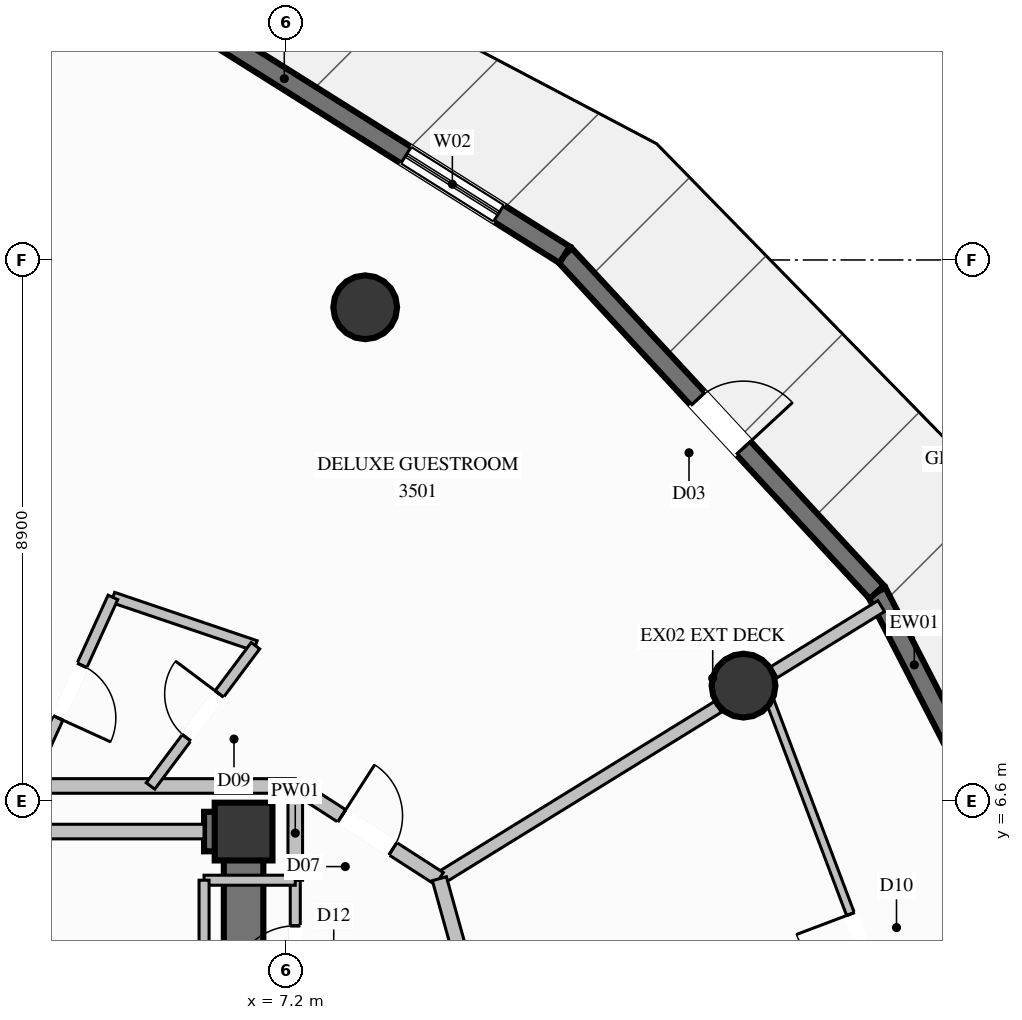
"""IFC4 building model, lengths in metres.
Left out: names, types, materials, properties, quantities, classifications, styles, units other than length and angle.
Written with IfcOpenShell. Run it as: python <this file> out.ifc"""

import sys

from ifc_helpers import new_model, si_unit, direction, frame, frame_2d, origin, origin_2d, place, context, subcontext, project, spatial, rectangle, circle, extrude, element, fill, save


model = new_model("IFC4")
c1 = context("Model", 3, precision=1e-05, world=origin(), true_north=direction((0.0, 1.0)))
c2 = subcontext(c1, "Body", "Model", "MODEL_VIEW")
j1 = project(units=[si_unit("LENGTHUNIT", "METRE"), si_unit("PLANEANGLEUNIT", "RADIAN")], contexts=[c1])
p1 = place(None, origin())
s1 = spatial("IfcSite", under=j1, at=p1, CompositionType="ELEMENT")
p2 = place(p1, origin())
s2 = spatial("IfcBuilding", under=s1, at=p2, CompositionType="ELEMENT")
p3 = place(p2, frame((0.0, 0.0, 131.4)))
s3 = spatial("IfcBuildingStorey", under=s2, at=p3, CompositionType="ELEMENT", Elevation=131.4)
p4 = place(p3, frame((6.5, 6.1, 0.0), z_axis=(0.0, 0.0, 1.0), x_axis=(1.0, 0.0, 0.0)))
e1 = element("IfcColumn", 1, at=p4, inside=s3, PredefinedType="COLUMN", context=c2, shape_type="SweptSolid", body=[
    extrude(rectangle(XDim=0.95, YDim=0.95, at=origin_2d()), origin(), (0.0, 0.0, 1.0), 3.6),
])
p5 = place(p3, frame((5.85, 6.1, 0.0), z_axis=(0.0, 0.0, 1.0), x_axis=(1.0, 0.0, 0.0)))
e2 = element("IfcWall", 2, at=p5, inside=s3, PredefinedType="SHEAR", context=c2, shape_type="SweptSolid", body=[
    extrude(rectangle(XDim=0.325, YDim=0.65, at=frame_2d((0.163, 0.0))), origin(), (0.0, 0.0, 1.0), 3.6),
])
p6 = place(p3, frame((6.5, 3.35, 0.0), z_axis=(0.0, 0.0, 1.0), x_axis=(0.0, 1.0, 0.0)))
e3 = element("IfcWall", 3, at=p6, inside=s3, PredefinedType="SHEAR", context=c2, shape_type="SweptSolid", body=[
    extrude(rectangle(XDim=3.075, YDim=0.65, at=frame_2d((1.538, 0.0))), origin(), (0.0, 0.0, 1.0), 3.6),
])
for number, where, z_axis, x_axis in (
    (4, (14.722, 8.5, 0.0), (0.0, 0.0, 1.0), (1.0, 0.0, 0.0)),
    (5, (8.5, 14.722, 0.0), (0.0, 0.0, 1.0), (1.0, 0.0, 0.0)),
):
    element("IfcColumn", number, at=place(p3, frame(where, z_axis=z_axis, x_axis=x_axis)), inside=s3, PredefinedType="COLUMN", context=c2, shape_type="SweptSolid", body=[
        extrude(circle(Radius=0.525, at=origin_2d()), origin(), (0.0, 0.0, 1.0), 3.6),
    ])
p7 = place(p3, frame((16.914, 10.037, 0.0), z_axis=(0.0, 0.0, 1.0), x_axis=(0.458173043938, -0.888863016335, 0.0)))
e6 = element("IfcWall", 6, at=p7, inside=s3, PredefinedType="SOLIDWALL", context=c2, shape_type="SweptSolid", body=[
    extrude(rectangle(XDim=7.346, YDim=0.32, at=frame_2d((3.673, 0.0))), origin(), (0.0, 0.0, 1.0), 3.35),
])
p8 = place(p7, frame((2.942, 0.0, 0.35)))
e7 = element("IfcOpeningElement", 7, at=p8, cuts=e6, PredefinedType="OPENING", context=c2, shape_type="SweptSolid", body=[
    extrude(rectangle(XDim=1.8, YDim=2.6, at=frame_2d((0.9, 1.3))), frame((0.0, 0.17, 0.0), z_axis=(0.0, -1.0, 0.0), x_axis=(1.0, 0.0, 0.0)), (0.0, 0.0, 1.0), 0.34),
])
p9 = place(p3, frame((11.78, 15.585, 0.0), z_axis=(0.0, 0.0, 1.0), x_axis=(0.679203838045, -0.733949689274, 0.0)))
e8 = element("IfcWall", 8, at=p9, inside=s3, PredefinedType="SOLIDWALL", context=c2, shape_type="SweptSolid", body=[
    extrude(rectangle(XDim=7.559, YDim=0.32, at=frame_2d((3.779, 0.0))), origin(), (0.0, 0.0, 1.0), 3.35),
])
p10 = place(p9, frame((3.229, 0.0, 0.0)))
e9 = element("IfcOpeningElement", 9, at=p10, cuts=e8, PredefinedType="OPENING", context=c2, shape_type="SweptSolid", body=[
    extrude(rectangle(XDim=1.1, YDim=2.2, at=frame_2d((0.55, 1.1))), frame((0.0, 0.17, 0.0), z_axis=(0.0, -1.0, 0.0), x_axis=(1.0, 0.0, 0.0)), (0.0, 0.0, 1.0), 0.34),
])
p11 = place(p3, frame((5.379, 19.607, 0.0), z_axis=(0.0, 0.0, 1.0), x_axis=(0.84673132195, -0.5320207406, 0.0)))
e10 = element("IfcWall", 10, at=p11, inside=s3, PredefinedType="SOLIDWALL", context=c2, shape_type="SweptSolid", body=[
    extrude(rectangle(XDim=7.56, YDim=0.32, at=frame_2d((3.78, 0.0))), origin(), (0.0, 0.0, 1.0), 3.35),
])
p12 = place(p11, frame((4.479, 0.0, 0.35)))
e11 = element("IfcOpeningElement", 11, at=p12, cuts=e10, PredefinedType="OPENING", context=c2, shape_type="SweptSolid", body=[
    extrude(rectangle(XDim=1.8, YDim=2.6, at=frame_2d((0.9, 1.3))), frame((0.0, 0.17, 0.0), z_axis=(0.0, -1.0, 0.0), x_axis=(1.0, 0.0, 0.0)), (0.0, 0.0, 1.0), 0.34),
])
p13 = place(p3, frame((-7.35, 6.85, 0.0), z_axis=(0.0, 0.0, 1.0), x_axis=(1.0, 0.0, 0.0)))
e12 = element("IfcWall", 12, at=p13, inside=s3, PredefinedType="PARTITIONING", context=c2, shape_type="SweptSolid", body=[
    extrude(rectangle(XDim=14.7, YDim=0.24, at=frame_2d((7.35, 0.0))), origin(), (0.0, 0.0, 1.0), 2.435),
])
p14 = place(p3, frame((7.35, 5.3, 0.0), z_axis=(0.0, 0.0, 1.0), x_axis=(0.0, 1.0, 0.0)))
e13 = element("IfcWall", 13, at=p14, inside=s3, PredefinedType="PARTITIONING", context=c2, shape_type="SweptSolid", body=[
    extrude(rectangle(XDim=1.55, YDim=0.24, at=frame_2d((0.775, 0.0))), origin(), (0.0, 0.0, 1.0), 2.435),
])
p15 = place(p3, frame((3.0, 6.1, 0.0), z_axis=(0.0, 0.0, 1.0), x_axis=(1.0, 0.0, 0.0)))
e14 = element("IfcWall", 14, at=p15, inside=s3, PredefinedType="PARTITIONING", context=c2, shape_type="SweptSolid", body=[
    extrude(rectangle(XDim=2.85, YDim=0.24, at=frame_2d((1.425, 0.0))), origin(), (0.0, 0.0, 1.0), 2.435),
])
p16 = place(p3, frame((7.35, 2.75, 0.0), z_axis=(0.0, 0.0, 1.0), x_axis=(0.0, 1.0, 0.0)))
e15 = element("IfcWall", 15, at=p16, inside=s3, PredefinedType="PARTITIONING", context=c2, shape_type="SweptSolid", body=[
    extrude(rectangle(XDim=2.55, YDim=0.165, at=frame_2d((1.275, 0.0))), origin(), (0.0, 0.0, 1.0), 3.35),
])
p17 = place(p16, frame((0.75, 0.0, 0.0)))
e16 = element("IfcOpeningElement", 16, at=p17, cuts=e15, PredefinedType="OPENING", context=c2, shape_type="SweptSolid", body=[
    extrude(rectangle(XDim=1.05, YDim=2.15, at=frame_2d((0.525, 1.075))), frame((0.0, 0.093, 0.0), z_axis=(0.0, -1.0, 0.0), x_axis=(1.0, 0.0, 0.0)), (0.0, 0.0, 1.0), 0.185),
])
p18 = place(p3, frame((7.35, 5.3, 0.0), z_axis=(0.0, 0.0, 1.0), x_axis=(-1.0, 0.0, 0.0)))
e17 = element("IfcWall", 17, at=p18, inside=s3, PredefinedType="PARTITIONING", context=c2, shape_type="SweptSolid", body=[
    extrude(rectangle(XDim=1.5, YDim=0.165, at=frame_2d((0.75, 0.0))), origin(), (0.0, 0.0, 1.0), 2.435),
])
p19 = place(p3, frame((5.85, 5.3, 0.0), z_axis=(0.0, 0.0, 1.0), x_axis=(0.0, -1.0, 0.0)))
e18 = element("IfcWall", 18, at=p19, inside=s3, PredefinedType="PARTITIONING", context=c2, shape_type="SweptSolid", body=[
    extrude(rectangle(XDim=2.55, YDim=0.165, at=frame_2d((1.275, 0.0))), origin(), (0.0, 0.0, 1.0), 2.435),
])
p20 = place(p3, frame((9.72, 5.325, 0.0), z_axis=(0.0, 0.0, 1.0), x_axis=(0.851091187082, 0.525017896144, 0.0)))
e19 = element("IfcWall", 19, at=p20, inside=s3, PredefinedType="PARTITIONING", context=c2, shape_type="SweptSolid", body=[
    extrude(rectangle(XDim=5.385, YDim=0.21, at=frame_2d((2.692, 0.0))), origin(), (0.0, 0.0, 1.0), 2.791),
])
p21 = place(p3, frame((15.221, 8.719, 0.0), z_axis=(0.0, 0.0, 1.0), x_axis=(0.851169117453, 0.524891544506, 0.0)))
e20 = element("IfcWall", 20, at=p21, inside=s3, PredefinedType="PARTITIONING", context=c2, shape_type="SweptSolid", body=[
    extrude(rectangle(XDim=2.075, YDim=0.21, at=frame_2d((1.038, 0.0))), origin(), (0.0, 0.0, 1.0), 3.35),
])
p22 = place(p3, frame((4.351, 9.951, 0.0), z_axis=(0.0, 0.0, 1.0), x_axis=(0.947023172819, -0.321165238069, 0.0)))
e21 = element("IfcWall", 21, at=p22, inside=s3, PredefinedType="PLUMBINGWALL", context=c2, shape_type="SweptSolid", body=[
    extrude(rectangle(XDim=2.475, YDim=0.175, at=frame_2d((1.238, 0.0))), origin(), (0.0, 0.0, 1.0), 3.35),
])
p23 = place(p3, frame((4.351, 9.951, 0.0), z_axis=(0.0, 0.0, 1.0), x_axis=(-0.414207844199, -0.910182323386, 0.0)))
e22 = element("IfcWall", 22, at=p23, inside=s3, PredefinedType="PLUMBINGWALL", context=c2, shape_type="SweptSolid", body=[
    extrude(rectangle(XDim=3.407, YDim=0.175, at=frame_2d((1.703, 0.0))), origin(), (0.0, 0.0, 1.0), 3.35),
])
p24 = place(p23, frame((1.228, 0.0, 0.0)))
e23 = element("IfcOpeningElement", 23, at=p24, cuts=e22, PredefinedType="OPENING", context=c2, shape_type="SweptSolid", body=[
    extrude(rectangle(XDim=0.95, YDim=2.1, at=frame_2d((0.475, 1.05))), frame((0.0, 0.098, 0.0), z_axis=(0.0, -1.0, 0.0), x_axis=(1.0, 0.0, 0.0)), (0.0, 0.0, 1.0), 0.195),
])
p25 = place(p3, frame((4.969, 6.85, 0.0), z_axis=(0.0, 0.0, 1.0), x_axis=(0.599253850401, 0.800559068888, 0.0)))
e24 = element("IfcWall", 24, at=p25, inside=s3, PredefinedType="PLUMBINGWALL", context=c2, shape_type="SweptSolid", body=[
    extrude(rectangle(XDim=2.88, YDim=0.175, at=frame_2d((1.44, 0.0))), origin(), (0.0, 0.0, 1.0), 2.791),
])
p26 = place(p25, frame((0.99, 0.0, 0.0)))
e25 = element("IfcOpeningElement", 25, at=p26, cuts=e24, PredefinedType="OPENING", context=c2, shape_type="SweptSolid", body=[
    extrude(rectangle(XDim=0.9, YDim=2.1, at=frame_2d((0.45, 1.05))), frame((0.0, 0.098, 0.0), z_axis=(0.0, -1.0, 0.0), x_axis=(1.0, 0.0, 0.0)), (0.0, 0.0, 1.0), 0.195),
])
p27 = place(p3, frame((7.35, 6.85, 0.0), z_axis=(0.0, 0.0, 1.0), x_axis=(0.840910978735, -0.541173471119, 0.0)))
e26 = element("IfcWall", 26, at=p27, inside=s3, PredefinedType="PARTITIONING", context=c2, shape_type="SweptSolid", body=[
    extrude(rectangle(XDim=2.818, YDim=0.24, at=frame_2d((1.409, 0.0))), origin(), (0.0, 0.0, 1.0), 3.35),
])
p28 = place(p27, frame((0.909, 0.0, 0.0)))
e27 = element("IfcOpeningElement", 27, at=p28, cuts=e26, PredefinedType="OPENING", context=c2, shape_type="SweptSolid", body=[
    extrude(rectangle(XDim=1.0, YDim=2.2, at=frame_2d((0.5, 1.1))), frame((0.0, 0.13, 0.0), z_axis=(0.0, -1.0, 0.0), x_axis=(1.0, 0.0, 0.0)), (0.0, 0.0, 1.0), 0.26),
])
p29 = place(p3, frame((11.2, 0.0, 0.0), z_axis=(0.0, 0.0, 1.0), x_axis=(-0.267782838254, 0.963479294815, 0.0)))
e28 = element("IfcWall", 28, at=p29, inside=s3, PredefinedType="PARTITIONING", context=c2, shape_type="SweptSolid", body=[
    extrude(rectangle(XDim=5.527, YDim=0.24, at=frame_2d((2.763, 0.0))), origin(), (0.0, 0.0, 1.0), 2.985),
])
p30 = place(p3, frame((18.272, 0.0, 0.0), z_axis=(0.0, 0.0, 1.0), x_axis=(-0.353302931562, 0.935508972993, 0.0)))
e29 = element("IfcWall", 29, at=p30, inside=s3, PredefinedType="PARTITIONING", context=c2, shape_type="SweptSolid", body=[
    extrude(rectangle(XDim=9.191, YDim=0.135, at=frame_2d((4.595, 0.0))), origin(), (0.0, 0.0, 1.0), 2.878),
])
p31 = place(p30, frame((4.12, 0.0, 0.0)))
e30 = element("IfcOpeningElement", 30, at=p31, cuts=e29, PredefinedType="OPENING", context=c2, shape_type="SweptSolid", body=[
    extrude(rectangle(XDim=0.95, YDim=2.1, at=frame_2d((0.475, 1.05))), frame((0.0, 0.078, 0.0), z_axis=(0.0, -1.0, 0.0), x_axis=(1.0, 0.0, 0.0)), (0.0, 0.0, 1.0), 0.155),
])
p32 = place(p10, origin())
e31 = element("IfcDoor", 31, at=p32, inside=s3, OperationType="SINGLE_SWING_RIGHT", PredefinedType="DOOR", context=c2, shape_type="SweptSolid", body=[
    extrude(rectangle(XDim=1.1, YDim=2.2, at=frame_2d((0.55, 1.1))), frame((0.0, 0.025, 0.0), z_axis=(0.0, -1.0, 0.0), x_axis=(1.0, 0.0, 0.0)), (0.0, 0.0, 1.0), 0.05),
])
fill(e9, e31)
p33 = place(p12, origin())
e32 = element("IfcWindow", 32, at=p33, inside=s3, PartitioningType="SINGLE_PANEL", PredefinedType="WINDOW", context=c2, shape_type="SweptSolid", body=[
    extrude(rectangle(XDim=1.8, YDim=2.6, at=frame_2d((0.9, 1.3))), frame((0.0, 0.03, 0.0), z_axis=(0.0, -1.0, 0.0), x_axis=(1.0, 0.0, 0.0)), (0.0, 0.0, 1.0), 0.06),
])
fill(e11, e32)
p34 = place(p17, origin())
e33 = element("IfcDoor", 33, at=p34, inside=s3, OperationType="SINGLE_SWING_LEFT", PredefinedType="DOOR", context=c2, shape_type="SweptSolid", body=[
    extrude(rectangle(XDim=1.05, YDim=2.15, at=frame_2d((0.525, 1.075))), frame((0.0, 0.025, 0.0), z_axis=(0.0, -1.0, 0.0), x_axis=(1.0, 0.0, 0.0)), (0.0, 0.0, 1.0), 0.05),
])
fill(e16, e33)
p35 = place(p26, origin())
e34 = element("IfcDoor", 34, at=p35, inside=s3, OperationType="SINGLE_SWING_RIGHT", PredefinedType="DOOR", context=c2, shape_type="SweptSolid", body=[
    extrude(rectangle(XDim=0.9, YDim=2.1, at=frame_2d((0.45, 1.05))), frame((0.0, 0.025, 0.0), z_axis=(0.0, -1.0, 0.0), x_axis=(1.0, 0.0, 0.0)), (0.0, 0.0, 1.0), 0.05),
])
fill(e25, e34)
p36 = place(p28, origin())
e35 = element("IfcDoor", 35, at=p36, inside=s3, OperationType="SINGLE_SWING_LEFT", PredefinedType="DOOR", context=c2, shape_type="SweptSolid", body=[
    extrude(rectangle(XDim=1.0, YDim=2.2, at=frame_2d((0.5, 1.1))), frame((0.0, 0.025, 0.0), z_axis=(0.0, -1.0, 0.0), x_axis=(1.0, 0.0, 0.0)), (0.0, 0.0, 1.0), 0.05),
])
fill(e27, e35)
p37 = place(p24, origin())
e36 = element("IfcDoor", 36, at=p37, inside=s3, OperationType="SINGLE_SWING_RIGHT", PredefinedType="DOOR", context=c2, shape_type="SweptSolid", body=[
    extrude(rectangle(XDim=0.95, YDim=2.1, at=frame_2d((0.475, 1.05))), frame((0.0, 0.025, 0.0), z_axis=(0.0, -1.0, 0.0), x_axis=(1.0, 0.0, 0.0)), (0.0, 0.0, 1.0), 0.05),
])
fill(e23, e36)
p38 = place(p31, origin())
e37 = element("IfcDoor", 37, at=p38, inside=s3, OperationType="SINGLE_SWING_RIGHT", PredefinedType="DOOR", context=c2, shape_type="SweptSolid", body=[
    extrude(rectangle(XDim=0.95, YDim=2.1, at=frame_2d((0.475, 1.05))), frame((0.0, 0.025, 0.0), z_axis=(0.0, -1.0, 0.0), x_axis=(1.0, 0.0, 0.0)), (0.0, 0.0, 1.0), 0.05),
])
fill(e30, e37)
save(model, sys.argv[1])
